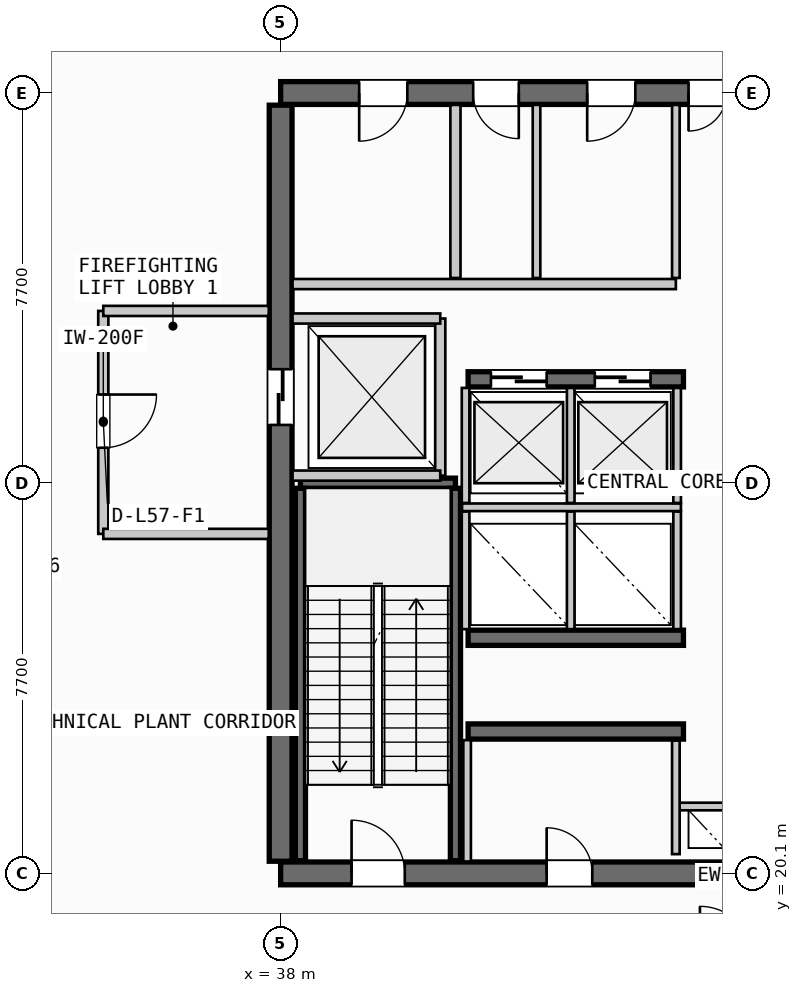
"""IFC4 building model, lengths in metres.
Left out: names, types, materials, properties, quantities, classifications, styles, units other than length and angle.
Written with IfcOpenShell. Run it as: python <this file> out.ifc"""

import sys

from ifc_helpers import new_model, si_unit, direction, frame, frame_2d, origin, place, context, subcontext, project, spatial, rectangle, extrude, source, transform, mapped, element, fill, save


model = new_model("IFC4")
c1 = context("Model", 3, precision=1e-05, world=origin(), true_north=direction((0.0, 1.0)))
c2 = subcontext(c1, "Body", "Model", "MODEL_VIEW")
j1 = project(units=[si_unit("LENGTHUNIT", "METRE"), si_unit("PLANEANGLEUNIT", "RADIAN")], contexts=[c1])
p1 = place(None, origin())
s1 = spatial("IfcSite", under=j1, at=p1, CompositionType="ELEMENT")
p2 = place(p1, origin())
s2 = spatial("IfcBuilding", under=s1, at=p2, CompositionType="ELEMENT")
p3 = place(p2, frame((0.0, 0.0, 218.4)))
s3 = spatial("IfcBuildingStorey", under=s2, at=p3, CompositionType="ELEMENT", Elevation=218.4)
p4 = place(p3, frame((38.0, 20.1, 0.0), z_axis=(0.0, 0.0, 1.0), x_axis=(1.0, 0.0, 0.0)))
e1 = element("IfcWall", 1, at=p4, inside=s3, PredefinedType="SHEAR", context=c2, shape_type="SweptSolid", body=[
    extrude(rectangle(XDim=17.6, YDim=0.45, at=frame_2d((8.8, 0.0))), origin(), (0.0, 0.0, 1.0), 4.89),
])
p5 = place(p4, frame((1.4, 0.0, 0.0)))
e2 = element("IfcOpeningElement", 2, at=p5, cuts=e1, PredefinedType="OPENING", context=c2, shape_type="SweptSolid", body=[
    extrude(rectangle(XDim=1.05, YDim=2.15, at=frame_2d((0.525, 1.075))), frame((0.0, 0.235, 0.0), z_axis=(0.0, -1.0, 0.0), x_axis=(1.0, 0.0, 0.0)), (0.0, 0.0, 1.0), 0.47),
])
p6 = place(p4, frame((15.15, 0.0, 0.0)))
e3 = element("IfcOpeningElement", 3, at=p6, cuts=e1, PredefinedType="OPENING", context=c2, shape_type="SweptSolid", body=[
    extrude(rectangle(XDim=1.05, YDim=2.15, at=frame_2d((0.525, 1.075))), frame((0.0, 0.235, 0.0), z_axis=(0.0, -1.0, 0.0), x_axis=(1.0, 0.0, 0.0)), (0.0, 0.0, 1.0), 0.47),
])
p7 = place(p4, frame((5.25, 0.0, 0.0)))
e4 = element("IfcOpeningElement", 4, at=p7, cuts=e1, PredefinedType="OPENING", context=c2, shape_type="SweptSolid", body=[
    extrude(rectangle(XDim=0.9, YDim=2.15, at=frame_2d((0.45, 1.075))), frame((0.0, 0.235, 0.0), z_axis=(0.0, -1.0, 0.0), x_axis=(1.0, 0.0, 0.0)), (0.0, 0.0, 1.0), 0.47),
])
p8 = place(p4, frame((11.4, 0.0, 0.0)))
e5 = element("IfcOpeningElement", 5, at=p8, cuts=e1, PredefinedType="OPENING", context=c2, shape_type="SweptSolid", body=[
    extrude(rectangle(XDim=0.95, YDim=2.15, at=frame_2d((0.475, 1.075))), frame((0.0, 0.235, 0.0), z_axis=(0.0, -1.0, 0.0), x_axis=(1.0, 0.0, 0.0)), (0.0, 0.0, 1.0), 0.47),
])
p9 = place(p3, frame((55.6, 35.5, 0.0), z_axis=(0.0, 0.0, 1.0), x_axis=(-1.0, 0.0, 0.0)))
e6 = element("IfcWall", 6, at=p9, inside=s3, PredefinedType="SHEAR", context=c2, shape_type="SweptSolid", body=[
    extrude(rectangle(XDim=17.6, YDim=0.45, at=frame_2d((8.8, 0.0))), origin(), (0.0, 0.0, 1.0), 4.89),
])
p10 = place(p9, frame((8.05, 0.0, 0.0)))
e7 = element("IfcOpeningElement", 7, at=p10, cuts=e6, PredefinedType="OPENING", context=c2, shape_type="SweptSolid", body=[
    extrude(rectangle(XDim=1.5, YDim=2.2, at=frame_2d((0.75, 1.1))), frame((0.0, 0.235, 0.0), z_axis=(0.0, -1.0, 0.0), x_axis=(1.0, 0.0, 0.0)), (0.0, 0.0, 1.0), 0.47),
])
p11 = place(p9, frame((15.1, 0.0, 0.0)))
e8 = element("IfcOpeningElement", 8, at=p11, cuts=e6, PredefinedType="OPENING", context=c2, shape_type="SweptSolid", body=[
    extrude(rectangle(XDim=0.95, YDim=2.15, at=frame_2d((0.475, 1.075))), frame((0.0, 0.235, 0.0), z_axis=(0.0, -1.0, 0.0), x_axis=(1.0, 0.0, 0.0)), (0.0, 0.0, 1.0), 0.47),
])
p12 = place(p9, frame((12.9, 0.0, 0.0)))
e9 = element("IfcOpeningElement", 9, at=p12, cuts=e6, PredefinedType="OPENING", context=c2, shape_type="SweptSolid", body=[
    extrude(rectangle(XDim=0.9, YDim=2.15, at=frame_2d((0.45, 1.075))), frame((0.0, 0.235, 0.0), z_axis=(0.0, -1.0, 0.0), x_axis=(1.0, 0.0, 0.0)), (0.0, 0.0, 1.0), 0.47),
])
p13 = place(p9, frame((10.6, 0.0, 0.0)))
e10 = element("IfcOpeningElement", 10, at=p13, cuts=e6, PredefinedType="OPENING", context=c2, shape_type="SweptSolid", body=[
    extrude(rectangle(XDim=0.95, YDim=2.15, at=frame_2d((0.475, 1.075))), frame((0.0, 0.235, 0.0), z_axis=(0.0, -1.0, 0.0), x_axis=(1.0, 0.0, 0.0)), (0.0, 0.0, 1.0), 0.47),
])
p14 = place(p3, frame((38.0, 35.26, 0.0), z_axis=(0.0, 0.0, 1.0), x_axis=(0.0, -1.0, 0.0)))
e11 = element("IfcWall", 11, at=p14, inside=s3, PredefinedType="SHEAR", context=c2, shape_type="SweptSolid", body=[
    extrude(rectangle(XDim=14.92, YDim=0.45, at=frame_2d((7.46, 0.0))), origin(), (0.0, 0.0, 1.0), 4.89),
])
p15 = place(p14, frame((5.21, 0.0, 0.0)))
e12 = element("IfcOpeningElement", 12, at=p15, cuts=e11, PredefinedType="OPENING", context=c2, shape_type="SweptSolid", body=[
    extrude(rectangle(XDim=1.1, YDim=2.2, at=frame_2d((0.55, 1.1))), frame((0.0, 0.235, 0.0), z_axis=(0.0, -1.0, 0.0), x_axis=(1.0, 0.0, 0.0)), (0.0, 0.0, 1.0), 0.47),
])
for number, where, z_axis, x_axis in (
    (13, (41.7, 22.9, 0.0), (0.0, 0.0, 1.0), (1.0, 0.0, 0.0)),
    (14, (41.7, 24.75, 0.0), (0.0, 0.0, 1.0), (1.0, 0.0, 0.0)),
):
    element("IfcWall", number, at=place(p3, frame(where, z_axis=z_axis, x_axis=x_axis)), inside=s3, PredefinedType="SHEAR", context=c2, shape_type="SweptSolid", body=[
        extrude(rectangle(XDim=4.25, YDim=0.3, at=frame_2d((2.125, 0.0))), origin(), (0.0, 0.0, 1.0), 4.89),
    ])
p16 = place(p3, frame((41.7, 29.85, 0.0), z_axis=(0.0, 0.0, 1.0), x_axis=(1.0, 0.0, 0.0)))
e15 = element("IfcWall", 15, at=p16, inside=s3, PredefinedType="SHEAR", context=c2, shape_type="SweptSolid", body=[
    extrude(rectangle(XDim=4.25, YDim=0.3, at=frame_2d((2.125, 0.0))), origin(), (0.0, 0.0, 1.0), 4.89),
])
p17 = place(p16, frame((0.45, 0.0, 0.0)))
e16 = element("IfcOpeningElement", 16, at=p17, cuts=e15, PredefinedType="OPENING", context=c2, shape_type="SweptSolid", body=[
    extrude(rectangle(XDim=1.1, YDim=2.2, at=frame_2d((0.55, 1.1))), frame((0.0, 0.16, 0.0), z_axis=(0.0, -1.0, 0.0), x_axis=(1.0, 0.0, 0.0)), (0.0, 0.0, 1.0), 0.32),
])
p18 = place(p16, frame((2.5, 0.0, 0.0)))
e17 = element("IfcOpeningElement", 17, at=p18, cuts=e15, PredefinedType="OPENING", context=c2, shape_type="SweptSolid", body=[
    extrude(rectangle(XDim=1.1, YDim=2.2, at=frame_2d((0.55, 1.1))), frame((0.0, 0.16, 0.0), z_axis=(0.0, -1.0, 0.0), x_axis=(1.0, 0.0, 0.0)), (0.0, 0.0, 1.0), 0.32),
])
p19 = place(p3, frame((38.39, 27.8, 0.0), z_axis=(0.0, 0.0, 1.0), x_axis=(1.0, 0.0, 0.0)))
e18 = element("IfcWall", 18, at=p19, inside=s3, PredefinedType="SHEAR", context=c2, shape_type="SweptSolid", body=[
    extrude(rectangle(XDim=3.06, YDim=0.2, at=frame_2d((1.53, 0.0))), origin(), (0.0, 0.0, 1.0), 4.89),
])
for number, where, z_axis, x_axis in (
    (19, (41.45, 27.7, 0.0), (0.0, 0.0, 1.0), (0.0, -1.0, 0.0)),
    (20, (38.39, 20.35, 0.0), (0.0, 0.0, 1.0), (0.0, 1.0, 0.0)),
):
    element("IfcWall", number, at=place(p3, frame(where, z_axis=z_axis, x_axis=x_axis)), inside=s3, PredefinedType="SHEAR", context=c2, shape_type="SweptSolid", body=[
        extrude(rectangle(XDim=7.35, YDim=0.2, at=frame_2d((3.675, 0.0))), origin(), (0.0, 0.0, 1.0), 4.89),
    ])
p20 = place(p3, frame((45.8, 21.42, 0.0), z_axis=(0.0, 0.0, 1.0), x_axis=(1.0, 0.0, 0.0)))
e21 = element("IfcWall", 21, at=p20, inside=s3, PredefinedType="PARTITIONING", context=c2, shape_type="SweptSolid", body=[
    extrude(rectangle(XDim=2.0, YDim=0.15, at=frame_2d((1.0, 0.0))), origin(), (0.0, 0.0, 1.0), 4.265),
])
p21 = place(p3, frame((45.8, 20.48, 0.0), z_axis=(0.0, 0.0, 1.0), x_axis=(0.0, 1.0, 0.0)))
e22 = element("IfcWall", 22, at=p21, inside=s3, PredefinedType="PARTITIONING", context=c2, shape_type="SweptSolid", body=[
    extrude(rectangle(XDim=2.24, YDim=0.15, at=frame_2d((1.12, 0.0))), origin(), (0.0, 0.0, 1.0), 4.265),
])
p22 = place(p3, frame((41.15, 27.95, 0.0), z_axis=(0.0, 0.0, 1.0), x_axis=(0.0, 1.0, 0.0)))
e23 = element("IfcWall", 23, at=p22, inside=s3, PredefinedType="PARTITIONING", context=c2, shape_type="SweptSolid", body=[
    extrude(rectangle(XDim=3.1, YDim=0.2, at=frame_2d((1.55, 0.0))), origin(), (0.0, 0.0, 1.0), 4.265),
])
for number, where, z_axis, x_axis in (
    (24, (38.235, 27.95, 0.0), (0.0, 0.0, 1.0), (1.0, 0.0, 0.0)),
    (25, (38.235, 31.05, 0.0), (0.0, 0.0, 1.0), (1.0, 0.0, 0.0)),
):
    element("IfcWall", number, at=place(p3, frame(where, z_axis=z_axis, x_axis=x_axis)), inside=s3, PredefinedType="PARTITIONING", context=c2, shape_type="SweptSolid", body=[
        extrude(rectangle(XDim=2.915, YDim=0.2, at=frame_2d((1.458, 0.0))), origin(), (0.0, 0.0, 1.0), 4.265),
    ])
p23 = place(p3, frame((34.5, 31.2, 0.0), z_axis=(0.0, 0.0, 1.0), x_axis=(0.0, -1.0, 0.0)))
e26 = element("IfcWall", 26, at=p23, inside=s3, PredefinedType="PARTITIONING", context=c2, shape_type="SweptSolid", body=[
    extrude(rectangle(XDim=4.4, YDim=0.2, at=frame_2d((2.2, 0.0))), origin(), (0.0, 0.0, 1.0), 4.265),
])
p24 = place(p23, frame((1.65, 0.0, 0.0)))
e27 = element("IfcOpeningElement", 27, at=p24, cuts=e26, PredefinedType="OPENING", context=c2, shape_type="SweptSolid", body=[
    extrude(rectangle(XDim=1.05, YDim=2.15, at=frame_2d((0.525, 1.075))), frame((0.0, 0.11, 0.0), z_axis=(0.0, -1.0, 0.0), x_axis=(1.0, 0.0, 0.0)), (0.0, 0.0, 1.0), 0.22),
])
for number, where, z_axis, x_axis in (
    (28, (34.5, 26.8, 0.0), (0.0, 0.0, 1.0), (1.0, 0.0, 0.0)),
    (29, (34.5, 31.2, 0.0), (0.0, 0.0, 1.0), (1.0, 0.0, 0.0)),
):
    element("IfcWall", number, at=place(p3, frame(where, z_axis=z_axis, x_axis=x_axis)), inside=s3, PredefinedType="PARTITIONING", context=c2, shape_type="SweptSolid", body=[
        extrude(rectangle(XDim=3.265, YDim=0.2, at=frame_2d((1.632, 0.0))), origin(), (0.0, 0.0, 1.0), 4.265),
    ])
p25 = place(p3, frame((41.68, 20.335, 0.0), z_axis=(0.0, 0.0, 1.0), x_axis=(0.0, 1.0, 0.0)))
e30 = element("IfcWall", 30, at=p25, inside=s3, PredefinedType="PARTITIONING", context=c2, shape_type="SweptSolid", body=[
    extrude(rectangle(XDim=2.395, YDim=0.15, at=frame_2d((1.198, 0.0))), origin(), (0.0, 0.0, 1.0), 4.265),
])
p26 = place(p3, frame((41.58, 27.325, 0.0), z_axis=(0.0, 0.0, 1.0), x_axis=(1.0, 0.0, 0.0)))
e31 = element("IfcWall", 31, at=p26, inside=s3, PredefinedType="PARTITIONING", context=c2, shape_type="SweptSolid", body=[
    extrude(rectangle(XDim=4.32, YDim=0.15, at=frame_2d((2.16, 0.0))), origin(), (0.0, 0.0, 1.0), 4.265),
])
for number, where, z_axis, x_axis in (
    (32, (41.65, 24.92, 0.0), (0.0, 0.0, 1.0), (0.0, 1.0, 0.0)),
    (33, (43.725, 24.92, 0.0), (0.0, 0.0, 1.0), (0.0, 1.0, 0.0)),
    (34, (45.825, 24.92, 0.0), (0.0, 0.0, 1.0), (0.0, 1.0, 0.0)),
):
    element("IfcWall", number, at=place(p3, frame(where, z_axis=z_axis, x_axis=x_axis)), inside=s3, PredefinedType="PARTITIONING", context=c2, shape_type="SweptSolid", body=[
        extrude(rectangle(XDim=2.32, YDim=0.15, at=frame_2d((1.16, 0.0))), origin(), (0.0, 0.0, 1.0), 4.265),
    ])
for number, where, z_axis, x_axis in (
    (35, (41.65, 27.41, 0.0), (0.0, 0.0, 1.0), (0.0, 1.0, 0.0)),
    (36, (43.725, 27.41, 0.0), (0.0, 0.0, 1.0), (0.0, 1.0, 0.0)),
    (37, (45.825, 27.41, 0.0), (0.0, 0.0, 1.0), (0.0, 1.0, 0.0)),
):
    element("IfcWall", number, at=place(p3, frame(where, z_axis=z_axis, x_axis=x_axis)), inside=s3, PredefinedType="PARTITIONING", context=c2, shape_type="SweptSolid", body=[
        extrude(rectangle(XDim=2.27, YDim=0.15, at=frame_2d((1.135, 0.0))), origin(), (0.0, 0.0, 1.0), 4.265),
    ])
p27 = place(p3, frame((41.45, 31.85, 0.0), z_axis=(0.0, 0.0, 1.0), x_axis=(0.0, 1.0, 0.0)))
e38 = element("IfcWall", 38, at=p27, inside=s3, PredefinedType="PARTITIONING", context=c2, shape_type="SweptSolid", body=[
    extrude(rectangle(XDim=3.415, YDim=0.2, at=frame_2d((1.708, 0.0))), origin(), (0.0, 0.0, 1.0), 4.265),
])
p28 = place(p3, frame((38.235, 31.73, 0.0), z_axis=(0.0, 0.0, 1.0), x_axis=(1.0, 0.0, 0.0)))
e39 = element("IfcWall", 39, at=p28, inside=s3, PredefinedType="PARTITIONING", context=c2, shape_type="SweptSolid", body=[
    extrude(rectangle(XDim=7.565, YDim=0.2, at=frame_2d((3.782, 0.0))), origin(), (0.0, 0.0, 1.0), 4.265),
])
p29 = place(p3, frame((45.8, 31.85, 0.0), z_axis=(0.0, 0.0, 1.0), x_axis=(0.0, 1.0, 0.0)))
e40 = element("IfcWall", 40, at=p29, inside=s3, PredefinedType="PARTITIONING", context=c2, shape_type="SweptSolid", body=[
    extrude(rectangle(XDim=3.415, YDim=0.15, at=frame_2d((1.708, 0.0))), origin(), (0.0, 0.0, 1.0), 4.265),
])
p30 = place(p3, frame((43.05, 31.85, 0.0), z_axis=(0.0, 0.0, 1.0), x_axis=(0.0, 1.0, 0.0)))
e41 = element("IfcWall", 41, at=p30, inside=s3, PredefinedType="PLUMBINGWALL", context=c2, shape_type="SweptSolid", body=[
    extrude(rectangle(XDim=3.415, YDim=0.15, at=frame_2d((1.708, 0.0))), origin(), (0.0, 0.0, 1.0), 4.265),
])
m1 = source(origin(), c2, "Body", "SweptSolid", [
    extrude(rectangle(XDim=1.05, YDim=2.15, at=frame_2d((0.525, 1.075))), frame((0.0, 0.025, 0.0), z_axis=(0.0, -1.0, 0.0), x_axis=(1.0, 0.0, 0.0)), (0.0, 0.0, 1.0), 0.05),
])
p31 = place(p5, origin())
e42 = element("IfcDoor", 42, at=p31, inside=s3, OperationType="SINGLE_SWING_LEFT", PredefinedType="DOOR", context=c2, shape_type="MappedRepresentation", body=[
    mapped(m1, transform((0.0, 0.0, 0.0), scale=1.0)),
])
fill(e2, e42)
m2 = source(origin(), c2, "Body", "SweptSolid", [
    extrude(rectangle(XDim=1.5, YDim=2.2, at=frame_2d((0.75, 1.1))), frame((0.0, 0.025, 0.0), z_axis=(0.0, -1.0, 0.0), x_axis=(1.0, 0.0, 0.0)), (0.0, 0.0, 1.0), 0.05),
])
p32 = place(p10, origin())
e43 = element("IfcDoor", 43, at=p32, inside=s3, OperationType="DOUBLE_DOOR_SINGLE_SWING", PredefinedType="DOOR", context=c2, shape_type="MappedRepresentation", body=[
    mapped(m2, transform((0.0, 0.0, 0.0), scale=1.0)),
])
fill(e7, e43)
m3 = source(origin(), c2, "Body", "SweptSolid", [
    extrude(rectangle(XDim=1.1, YDim=2.2, at=frame_2d((0.55, 1.1))), frame((0.0, 0.025, 0.0), z_axis=(0.0, -1.0, 0.0), x_axis=(1.0, 0.0, 0.0)), (0.0, 0.0, 1.0), 0.05),
])
p33 = place(p15, origin())
e44 = element("IfcDoor", 44, at=p33, inside=s3, OperationType="SLIDING_TO_LEFT", PredefinedType="DOOR", context=c2, shape_type="MappedRepresentation", body=[
    mapped(m3, transform((0.0, 0.0, 0.0), scale=1.0)),
])
fill(e12, e44)
m4 = source(origin(), c2, "Body", "SweptSolid", [
    extrude(rectangle(XDim=0.9, YDim=2.15, at=frame_2d((0.45, 1.075))), frame((0.0, 0.025, 0.0), z_axis=(0.0, -1.0, 0.0), x_axis=(1.0, 0.0, 0.0)), (0.0, 0.0, 1.0), 0.05),
])
p34 = place(p7, origin())
e45 = element("IfcDoor", 45, at=p34, inside=s3, OperationType="SINGLE_SWING_LEFT", PredefinedType="DOOR", context=c2, shape_type="MappedRepresentation", body=[
    mapped(m4, transform((0.0, 0.0, 0.0), scale=1.0)),
])
fill(e4, e45)
p35 = place(p17, origin())
e46 = element("IfcDoor", 46, at=p35, inside=s3, OperationType="SLIDING_TO_LEFT", PredefinedType="DOOR", context=c2, shape_type="MappedRepresentation", body=[
    mapped(m3, transform((0.0, 0.0, 0.0), scale=1.0)),
])
fill(e16, e46)
p36 = place(p18, origin())
e47 = element("IfcDoor", 47, at=p36, inside=s3, OperationType="SLIDING_TO_LEFT", PredefinedType="DOOR", context=c2, shape_type="MappedRepresentation", body=[
    mapped(m3, transform((0.0, 0.0, 0.0), scale=1.0)),
])
fill(e17, e47)
m5 = source(origin(), c2, "Body", "SweptSolid", [
    extrude(rectangle(XDim=0.95, YDim=2.15, at=frame_2d((0.475, 1.075))), frame((0.0, 0.025, 0.0), z_axis=(0.0, -1.0, 0.0), x_axis=(1.0, 0.0, 0.0)), (0.0, 0.0, 1.0), 0.05),
])
p37 = place(p11, origin())
e48 = element("IfcDoor", 48, at=p37, inside=s3, OperationType="SINGLE_SWING_RIGHT", PredefinedType="DOOR", context=c2, shape_type="MappedRepresentation", body=[
    mapped(m5, transform((0.0, 0.0, 0.0), scale=1.0)),
])
fill(e8, e48)
p38 = place(p12, origin())
e49 = element("IfcDoor", 49, at=p38, inside=s3, OperationType="SINGLE_SWING_LEFT", PredefinedType="DOOR", context=c2, shape_type="MappedRepresentation", body=[
    mapped(m4, transform((0.0, 0.0, 0.0), scale=1.0)),
])
fill(e9, e49)
p39 = place(p13, origin())
e50 = element("IfcDoor", 50, at=p39, inside=s3, OperationType="SINGLE_SWING_RIGHT", PredefinedType="DOOR", context=c2, shape_type="MappedRepresentation", body=[
    mapped(m5, transform((0.0, 0.0, 0.0), scale=1.0)),
])
fill(e10, e50)
p40 = place(p24, origin())
e51 = element("IfcDoor", 51, at=p40, inside=s3, OperationType="SINGLE_SWING_LEFT", PredefinedType="DOOR", context=c2, shape_type="MappedRepresentation", body=[
    mapped(m1, transform((0.0, 0.0, 0.0), scale=1.0)),
])
fill(e27, e51)
save(model, sys.argv[1])
